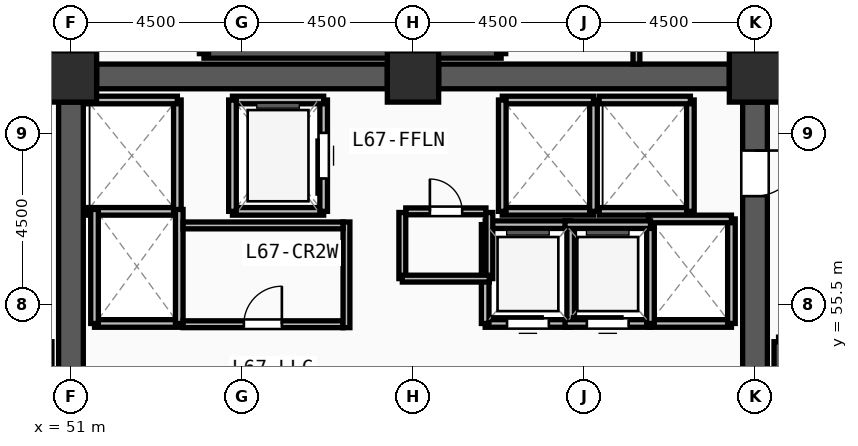
"""IFC4 building model, lengths in metres.
Left out: names, types, materials, properties, quantities, classifications, styles, units other than length and angle.
Written with IfcOpenShell. Run it as: python <this file> out.ifc"""

import sys

from ifc_helpers import new_model, si_unit, direction, frame, frame_2d, origin, origin_2d, place, context, subcontext, project, spatial, rectangle, extrude, source, transform, mapped, element, fill, save


model = new_model("IFC4")
c1 = context("Model", 3, precision=1e-05, world=origin(), true_north=direction((0.0, 1.0)))
c2 = subcontext(c1, "Body", "Model", "MODEL_VIEW")
j1 = project(units=[si_unit("LENGTHUNIT", "METRE"), si_unit("PLANEANGLEUNIT", "RADIAN")], contexts=[c1])
p1 = place(None, origin())
s1 = spatial("IfcSite", under=j1, at=p1, CompositionType="ELEMENT")
p2 = place(p1, origin())
s2 = spatial("IfcBuilding", under=s1, at=p2, CompositionType="ELEMENT")
p3 = place(p2, frame((0.0, 0.0, 258.75)))
s3 = spatial("IfcBuildingStorey", under=s2, at=p3, CompositionType="ELEMENT", Elevation=258.75)
m1 = source(origin(), c2, "Body", "SweptSolid", [
    extrude(rectangle(XDim=1.35, YDim=1.35, at=origin_2d()), origin(), (0.0, 0.0, 1.0), 3.75),
])
for number, where, z_axis, x_axis in (
    (1, (69.0, 61.5, 0.0), (0.0, 0.0, 1.0), (1.0, 0.0, 0.0)),
    (2, (60.0, 61.5, 0.0), (0.0, 0.0, 1.0), (1.0, 0.0, 0.0)),
    (3, (51.0, 61.5, 0.0), (0.0, 0.0, 1.0), (1.0, 0.0, 0.0)),
):
    element("IfcColumn", number, at=place(p3, frame(where, z_axis=z_axis, x_axis=x_axis)), inside=s3, PredefinedType="COLUMN", context=c2, shape_type="MappedRepresentation", body=[
        mapped(m1, transform((0.0, 0.0, 0.0), x_axis=(1.0, 0.0, 0.0), y_axis=(0.0, 1.0, 0.0), z_axis=(0.0, 0.0, 1.0), scale=1.0)),
    ])
for number, where, z_axis, x_axis in (
    (4, (51.675, 61.5, 0.0), (0.0, 0.0, 1.0), (1.0, 0.0, 0.0)),
    (5, (60.675, 61.5, 0.0), (0.0, 0.0, 1.0), (1.0, 0.0, 0.0)),
):
    element("IfcWall", number, at=place(p3, frame(where, z_axis=z_axis, x_axis=x_axis)), inside=s3, PredefinedType="SHEAR", context=c2, shape_type="SweptSolid", body=[
        extrude(rectangle(XDim=7.65, YDim=0.65, at=frame_2d((3.825, 0.0))), origin(), (0.0, 0.0, 1.0), 3.57),
    ])
p4 = place(p3, frame((69.0, 60.825, 0.0), z_axis=(0.0, 0.0, 1.0), x_axis=(0.0, -1.0, 0.0)))
e6 = element("IfcWall", 6, at=p4, inside=s3, PredefinedType="SHEAR", context=c2, shape_type="SweptSolid", body=[
    extrude(rectangle(XDim=13.65, YDim=0.65, at=frame_2d((6.825, 0.0))), origin(), (0.0, 0.0, 1.0), 3.57),
])
m2 = source(origin(), c2, "Body", "SweptSolid", [
    extrude(rectangle(XDim=1.2, YDim=2.2, at=frame_2d((0.6, 1.1))), frame((0.0, 0.335, 0.0), z_axis=(0.0, -1.0, 0.0), x_axis=(1.0, 0.0, 0.0)), (0.0, 0.0, 1.0), 0.67),
])
p5 = place(p4, frame((1.275, 0.0, 0.0)))
e7 = element("IfcOpeningElement", 7, at=p5, cuts=e6, PredefinedType="OPENING", context=c2, shape_type="MappedRepresentation", body=[
    mapped(m2, transform((0.0, 0.0, 0.0), x_axis=(1.0, 0.0, 0.0), y_axis=(0.0, 1.0, 0.0), z_axis=(0.0, 0.0, 1.0), scale=1.0)),
])
p6 = place(p3, frame((51.0, 47.175, 0.0), z_axis=(0.0, 0.0, 1.0), x_axis=(0.0, 1.0, 0.0)))
e8 = element("IfcWall", 8, at=p6, inside=s3, PredefinedType="SHEAR", context=c2, shape_type="SweptSolid", body=[
    extrude(rectangle(XDim=13.65, YDim=0.65, at=frame_2d((6.825, 0.0))), origin(), (0.0, 0.0, 1.0), 3.57),
])
for number, where, z_axis, x_axis in (
    (9, (69.62, 54.52, 0.0), (0.0, 0.0, 1.0), (0.0, -1.0, 0.0)),
    (10, (54.5, 62.1, 0.0), (0.0, 0.0, 1.0), (1.0, 0.0, 0.0)),
):
    element("IfcWall", number, at=place(p3, frame(where, z_axis=z_axis, x_axis=x_axis)), inside=s3, PredefinedType="SOLIDWALL", context=c2, shape_type="SweptSolid", body=[
        extrude(rectangle(XDim=7.82, YDim=0.24, at=frame_2d((3.91, 0.0))), origin(), (0.0, 0.0, 1.0), 3.57),
    ])
for number, where, z_axis, x_axis in (
    (11, (62.32, 62.1, 0.0), (0.0, 0.0, 1.0), (0.0, 1.0, 0.0)),
    (12, (54.5, 65.54, 0.0), (0.0, 0.0, 1.0), (0.0, -1.0, 0.0)),
):
    element("IfcWall", number, at=place(p3, frame(where, z_axis=z_axis, x_axis=x_axis)), inside=s3, PredefinedType="SOLIDWALL", context=c2, shape_type="SweptSolid", body=[
        extrude(rectangle(XDim=3.44, YDim=0.24, at=frame_2d((1.72, 0.0))), origin(), (0.0, 0.0, 1.0), 3.57),
    ])
p7 = place(p3, frame((55.25, 57.95, 0.0), z_axis=(0.0, 0.0, 1.0), x_axis=(1.0, 0.0, 0.0)))
e13 = element("IfcWall", 13, at=p7, inside=s3, PredefinedType="SOLIDWALL", context=c2, shape_type="SweptSolid", body=[
    extrude(rectangle(XDim=2.4, YDim=0.2, at=frame_2d((1.2, 0.0))), origin(), (0.0, 0.0, 1.0), 3.57),
])
p8 = place(p3, frame((57.65, 57.95, 0.0), z_axis=(0.0, 0.0, 1.0), x_axis=(0.0, 1.0, 0.0)))
e14 = element("IfcWall", 14, at=p8, inside=s3, PredefinedType="SOLIDWALL", context=c2, shape_type="SweptSolid", body=[
    extrude(rectangle(XDim=2.93, YDim=0.2, at=frame_2d((1.465, 0.0))), origin(), (0.0, 0.0, 1.0), 3.57),
])
m3 = source(origin(), c2, "Body", "SweptSolid", [
    extrude(rectangle(XDim=1.2, YDim=2.3, at=frame_2d((0.6, 1.15))), frame((0.0, 0.11, 0.0), z_axis=(0.0, -1.0, 0.0), x_axis=(1.0, 0.0, 0.0)), (0.0, 0.0, 1.0), 0.22),
])
p9 = place(p8, frame((0.865, 0.0, 0.0)))
e15 = element("IfcOpeningElement", 15, at=p9, cuts=e14, PredefinedType="OPENING", context=c2, shape_type="MappedRepresentation", body=[
    mapped(m3, transform((0.0, 0.0, 0.0), x_axis=(1.0, 0.0, 0.0), y_axis=(0.0, 1.0, 0.0), z_axis=(0.0, 0.0, 1.0), scale=1.0)),
])
p10 = place(p3, frame((57.65, 60.88, 0.0), z_axis=(0.0, 0.0, 1.0), x_axis=(-1.0, 0.0, 0.0)))
e16 = element("IfcWall", 16, at=p10, inside=s3, PredefinedType="SOLIDWALL", context=c2, shape_type="SweptSolid", body=[
    extrude(rectangle(XDim=2.4, YDim=0.2, at=frame_2d((1.2, 0.0))), origin(), (0.0, 0.0, 1.0), 3.57),
])
p11 = place(p3, frame((55.25, 60.88, 0.0), z_axis=(0.0, 0.0, 1.0), x_axis=(0.0, -1.0, 0.0)))
e17 = element("IfcWall", 17, at=p11, inside=s3, PredefinedType="SOLIDWALL", context=c2, shape_type="SweptSolid", body=[
    extrude(rectangle(XDim=2.93, YDim=0.2, at=frame_2d((1.465, 0.0))), origin(), (0.0, 0.0, 1.0), 3.57),
])
p12 = place(p3, frame((62.35, 57.95, 0.0), z_axis=(0.0, 0.0, 1.0), x_axis=(1.0, 0.0, 0.0)))
e18 = element("IfcWall", 18, at=p12, inside=s3, PredefinedType="SOLIDWALL", context=c2, shape_type="SweptSolid", body=[
    extrude(rectangle(XDim=2.4, YDim=0.2, at=frame_2d((1.2, 0.0))), origin(), (0.0, 0.0, 1.0), 3.57),
])
p13 = place(p3, frame((64.75, 57.95, 0.0), z_axis=(0.0, 0.0, 1.0), x_axis=(0.0, 1.0, 0.0)))
e19 = element("IfcWall", 19, at=p13, inside=s3, PredefinedType="SOLIDWALL", context=c2, shape_type="SweptSolid", body=[
    extrude(rectangle(XDim=2.93, YDim=0.2, at=frame_2d((1.465, 0.0))), origin(), (0.0, 0.0, 1.0), 3.57),
])
p14 = place(p3, frame((64.75, 60.88, 0.0), z_axis=(0.0, 0.0, 1.0), x_axis=(-1.0, 0.0, 0.0)))
e20 = element("IfcWall", 20, at=p14, inside=s3, PredefinedType="SOLIDWALL", context=c2, shape_type="SweptSolid", body=[
    extrude(rectangle(XDim=2.4, YDim=0.2, at=frame_2d((1.2, 0.0))), origin(), (0.0, 0.0, 1.0), 3.57),
])
p15 = place(p3, frame((62.35, 60.88, 0.0), z_axis=(0.0, 0.0, 1.0), x_axis=(0.0, -1.0, 0.0)))
e21 = element("IfcWall", 21, at=p15, inside=s3, PredefinedType="SOLIDWALL", context=c2, shape_type="SweptSolid", body=[
    extrude(rectangle(XDim=2.93, YDim=0.2, at=frame_2d((1.465, 0.0))), origin(), (0.0, 0.0, 1.0), 3.57),
])
p16 = place(p3, frame((64.9, 57.95, 0.0), z_axis=(0.0, 0.0, 1.0), x_axis=(1.0, 0.0, 0.0)))
e22 = element("IfcWall", 22, at=p16, inside=s3, PredefinedType="SOLIDWALL", context=c2, shape_type="SweptSolid", body=[
    extrude(rectangle(XDim=2.4, YDim=0.2, at=frame_2d((1.2, 0.0))), origin(), (0.0, 0.0, 1.0), 3.57),
])
p17 = place(p3, frame((67.3, 57.95, 0.0), z_axis=(0.0, 0.0, 1.0), x_axis=(0.0, 1.0, 0.0)))
e23 = element("IfcWall", 23, at=p17, inside=s3, PredefinedType="SOLIDWALL", context=c2, shape_type="SweptSolid", body=[
    extrude(rectangle(XDim=2.93, YDim=0.2, at=frame_2d((1.465, 0.0))), origin(), (0.0, 0.0, 1.0), 3.57),
])
for number, where, z_axis, x_axis in (
    (24, (67.3, 60.88, 0.0), (0.0, 0.0, 1.0), (-1.0, 0.0, 0.0)),
    (25, (51.4, 57.95, 0.0), (0.0, 0.0, 1.0), (1.0, 0.0, 0.0)),
):
    element("IfcWall", number, at=place(p3, frame(where, z_axis=z_axis, x_axis=x_axis)), inside=s3, PredefinedType="SOLIDWALL", context=c2, shape_type="SweptSolid", body=[
        extrude(rectangle(XDim=2.4, YDim=0.2, at=frame_2d((1.2, 0.0))), origin(), (0.0, 0.0, 1.0), 3.57),
    ])
p18 = place(p3, frame((53.8, 57.95, 0.0), z_axis=(0.0, 0.0, 1.0), x_axis=(0.0, 1.0, 0.0)))
e26 = element("IfcWall", 26, at=p18, inside=s3, PredefinedType="SOLIDWALL", context=c2, shape_type="SweptSolid", body=[
    extrude(rectangle(XDim=2.93, YDim=0.2, at=frame_2d((1.465, 0.0))), origin(), (0.0, 0.0, 1.0), 3.57),
])
p19 = place(p3, frame((53.8, 60.88, 0.0), z_axis=(0.0, 0.0, 1.0), x_axis=(-1.0, 0.0, 0.0)))
e27 = element("IfcWall", 27, at=p19, inside=s3, PredefinedType="SOLIDWALL", context=c2, shape_type="SweptSolid", body=[
    extrude(rectangle(XDim=2.4, YDim=0.2, at=frame_2d((1.2, 0.0))), origin(), (0.0, 0.0, 1.0), 3.57),
])
p20 = place(p3, frame((51.62, 55.0, 0.0), z_axis=(0.0, 0.0, 1.0), x_axis=(1.0, 0.0, 0.0)))
e28 = element("IfcWall", 28, at=p20, inside=s3, PredefinedType="SOLIDWALL", context=c2, shape_type="SweptSolid", body=[
    extrude(rectangle(XDim=2.23, YDim=0.2, at=frame_2d((1.115, 0.0))), origin(), (0.0, 0.0, 1.0), 3.57),
])
for number, where, z_axis, x_axis in (
    (29, (53.85, 55.0, 0.0), (0.0, 0.0, 1.0), (0.0, 1.0, 0.0)),
    (30, (51.62, 58.0, 0.0), (0.0, 0.0, 1.0), (0.0, -1.0, 0.0)),
):
    element("IfcWall", number, at=place(p3, frame(where, z_axis=z_axis, x_axis=x_axis)), inside=s3, PredefinedType="SOLIDWALL", context=c2, shape_type="SweptSolid", body=[
        extrude(rectangle(XDim=3.0, YDim=0.2, at=frame_2d((1.5, 0.0))), origin(), (0.0, 0.0, 1.0), 3.57),
    ])
p21 = place(p3, frame((66.2, 55.0, 0.0), z_axis=(0.0, 0.0, 1.0), x_axis=(1.0, 0.0, 0.0)))
e31 = element("IfcWall", 31, at=p21, inside=s3, PredefinedType="SOLIDWALL", context=c2, shape_type="SweptSolid", body=[
    extrude(rectangle(XDim=2.18, YDim=0.2, at=frame_2d((1.09, 0.0))), origin(), (0.0, 0.0, 1.0), 3.57),
])
p22 = place(p3, frame((68.38, 55.0, 0.0), z_axis=(0.0, 0.0, 1.0), x_axis=(0.0, 1.0, 0.0)))
e32 = element("IfcWall", 32, at=p22, inside=s3, PredefinedType="SOLIDWALL", context=c2, shape_type="SweptSolid", body=[
    extrude(rectangle(XDim=2.75, YDim=0.2, at=frame_2d((1.375, 0.0))), origin(), (0.0, 0.0, 1.0), 3.57),
])
p23 = place(p3, frame((68.38, 57.75, 0.0), z_axis=(0.0, 0.0, 1.0), x_axis=(-1.0, 0.0, 0.0)))
e33 = element("IfcWall", 33, at=p23, inside=s3, PredefinedType="SOLIDWALL", context=c2, shape_type="SweptSolid", body=[
    extrude(rectangle(XDim=2.18, YDim=0.2, at=frame_2d((1.09, 0.0))), origin(), (0.0, 0.0, 1.0), 3.57),
])
p24 = place(p3, frame((61.9, 55.0, 0.0), z_axis=(0.0, 0.0, 1.0), x_axis=(1.0, 0.0, 0.0)))
e34 = element("IfcWall", 34, at=p24, inside=s3, PredefinedType="SOLIDWALL", context=c2, shape_type="SweptSolid", body=[
    extrude(rectangle(XDim=2.25, YDim=0.2, at=frame_2d((1.125, 0.0))), origin(), (0.0, 0.0, 1.0), 3.57),
])
m4 = source(origin(), c2, "Body", "SweptSolid", [
    extrude(rectangle(XDim=1.1, YDim=2.2, at=frame_2d((0.55, 1.1))), frame((0.0, 0.11, 0.0), z_axis=(0.0, -1.0, 0.0), x_axis=(1.0, 0.0, 0.0)), (0.0, 0.0, 1.0), 0.22),
])
p25 = place(p24, frame((0.575, 0.0, 0.0)))
e35 = element("IfcOpeningElement", 35, at=p25, cuts=e34, PredefinedType="OPENING", context=c2, shape_type="MappedRepresentation", body=[
    mapped(m4, transform((0.0, 0.0, 0.0), x_axis=(1.0, 0.0, 0.0), y_axis=(0.0, 1.0, 0.0), z_axis=(0.0, 0.0, 1.0), scale=1.0)),
])
p26 = place(p3, frame((64.15, 55.0, 0.0), z_axis=(0.0, 0.0, 1.0), x_axis=(0.0, 1.0, 0.0)))
e36 = element("IfcWall", 36, at=p26, inside=s3, PredefinedType="SOLIDWALL", context=c2, shape_type="SweptSolid", body=[
    extrude(rectangle(XDim=2.6, YDim=0.2, at=frame_2d((1.3, 0.0))), origin(), (0.0, 0.0, 1.0), 3.57),
])
p27 = place(p3, frame((64.15, 57.6, 0.0), z_axis=(0.0, 0.0, 1.0), x_axis=(-1.0, 0.0, 0.0)))
e37 = element("IfcWall", 37, at=p27, inside=s3, PredefinedType="SOLIDWALL", context=c2, shape_type="SweptSolid", body=[
    extrude(rectangle(XDim=2.25, YDim=0.2, at=frame_2d((1.125, 0.0))), origin(), (0.0, 0.0, 1.0), 3.57),
])
p28 = place(p3, frame((61.9, 57.6, 0.0), z_axis=(0.0, 0.0, 1.0), x_axis=(0.0, -1.0, 0.0)))
e38 = element("IfcWall", 38, at=p28, inside=s3, PredefinedType="SOLIDWALL", context=c2, shape_type="SweptSolid", body=[
    extrude(rectangle(XDim=2.6, YDim=0.2, at=frame_2d((1.3, 0.0))), origin(), (0.0, 0.0, 1.0), 3.57),
])
p29 = place(p3, frame((64.0, 55.0, 0.0), z_axis=(0.0, 0.0, 1.0), x_axis=(1.0, 0.0, 0.0)))
e39 = element("IfcWall", 39, at=p29, inside=s3, PredefinedType="SOLIDWALL", context=c2, shape_type="SweptSolid", body=[
    extrude(rectangle(XDim=2.25, YDim=0.2, at=frame_2d((1.125, 0.0))), origin(), (0.0, 0.0, 1.0), 3.57),
])
p30 = place(p29, frame((0.575, 0.0, 0.0)))
e40 = element("IfcOpeningElement", 40, at=p30, cuts=e39, PredefinedType="OPENING", context=c2, shape_type="MappedRepresentation", body=[
    mapped(m4, transform((0.0, 0.0, 0.0), x_axis=(1.0, 0.0, 0.0), y_axis=(0.0, 1.0, 0.0), z_axis=(0.0, 0.0, 1.0), scale=1.0)),
])
p31 = place(p3, frame((66.25, 55.0, 0.0), z_axis=(0.0, 0.0, 1.0), x_axis=(0.0, 1.0, 0.0)))
e41 = element("IfcWall", 41, at=p31, inside=s3, PredefinedType="SOLIDWALL", context=c2, shape_type="SweptSolid", body=[
    extrude(rectangle(XDim=2.6, YDim=0.2, at=frame_2d((1.3, 0.0))), origin(), (0.0, 0.0, 1.0), 3.57),
])
p32 = place(p3, frame((66.25, 57.6, 0.0), z_axis=(0.0, 0.0, 1.0), x_axis=(-1.0, 0.0, 0.0)))
e42 = element("IfcWall", 42, at=p32, inside=s3, PredefinedType="SOLIDWALL", context=c2, shape_type="SweptSolid", body=[
    extrude(rectangle(XDim=2.25, YDim=0.2, at=frame_2d((1.125, 0.0))), origin(), (0.0, 0.0, 1.0), 3.57),
])
p33 = place(p3, frame((53.95, 54.98, 0.0), z_axis=(0.0, 0.0, 1.0), x_axis=(1.0, 0.0, 0.0)))
e43 = element("IfcWall", 43, at=p33, inside=s3, PredefinedType="PARTITIONING", context=c2, shape_type="SweptSolid", body=[
    extrude(rectangle(XDim=4.21, YDim=0.18, at=frame_2d((2.105, 0.0))), origin(), (0.0, 0.0, 1.0), 3.57),
])
m5 = source(origin(), c2, "Body", "SweptSolid", [
    extrude(rectangle(XDim=1.0, YDim=2.2, at=frame_2d((0.5, 1.1))), frame((0.0, 0.1, 0.0), z_axis=(0.0, -1.0, 0.0), x_axis=(1.0, 0.0, 0.0)), (0.0, 0.0, 1.0), 0.2),
])
p34 = place(p33, frame((1.6, 0.0, 0.0)))
e44 = element("IfcOpeningElement", 44, at=p34, cuts=e43, PredefinedType="OPENING", context=c2, shape_type="MappedRepresentation", body=[
    mapped(m5, transform((0.0, 0.0, 0.0), x_axis=(1.0, 0.0, 0.0), y_axis=(0.0, 1.0, 0.0), z_axis=(0.0, 0.0, 1.0), scale=1.0)),
])
p35 = place(p3, frame((59.81, 57.95, 0.0), z_axis=(0.0, 0.0, 1.0), x_axis=(1.0, 0.0, 0.0)))
e45 = element("IfcWall", 45, at=p35, inside=s3, PredefinedType="PARTITIONING", context=c2, shape_type="SweptSolid", body=[
    extrude(rectangle(XDim=2.11, YDim=0.18, at=frame_2d((1.055, 0.0))), origin(), (0.0, 0.0, 1.0), 3.57),
])
m6 = source(origin(), c2, "Body", "SweptSolid", [
    extrude(rectangle(XDim=0.85, YDim=2.1, at=frame_2d((0.425, 1.05))), frame((0.0, 0.1, 0.0), z_axis=(0.0, -1.0, 0.0), x_axis=(1.0, 0.0, 0.0)), (0.0, 0.0, 1.0), 0.2),
])
p36 = place(p35, frame((0.635, 0.0, 0.0)))
e46 = element("IfcOpeningElement", 46, at=p36, cuts=e45, PredefinedType="OPENING", context=c2, shape_type="MappedRepresentation", body=[
    mapped(m6, transform((0.0, 0.0, 0.0), x_axis=(1.0, 0.0, 0.0), y_axis=(0.0, 1.0, 0.0), z_axis=(0.0, 0.0, 1.0), scale=1.0)),
])
for number, where, z_axis, x_axis in (
    (47, (59.72, 56.18, 0.0), (0.0, 0.0, 1.0), (0.0, 1.0, 0.0)),
    (48, (62.01, 56.18, 0.0), (0.0, 0.0, 1.0), (0.0, 1.0, 0.0)),
):
    element("IfcWall", number, at=place(p3, frame(where, z_axis=z_axis, x_axis=x_axis)), inside=s3, PredefinedType="PARTITIONING", context=c2, shape_type="SweptSolid", body=[
        extrude(rectangle(XDim=1.74, YDim=0.18, at=frame_2d((0.87, 0.0))), origin(), (0.0, 0.0, 1.0), 3.57),
    ])
p37 = place(p3, frame((59.72, 56.18, 0.0), z_axis=(0.0, 0.0, 1.0), x_axis=(1.0, 0.0, 0.0)))
e49 = element("IfcWall", 49, at=p37, inside=s3, PredefinedType="PARTITIONING", context=c2, shape_type="SweptSolid", body=[
    extrude(rectangle(XDim=2.29, YDim=0.18, at=frame_2d((1.145, 0.0))), origin(), (0.0, 0.0, 1.0), 3.57),
])
p38 = place(p3, frame((65.88, 61.825, 0.0), z_axis=(0.0, 0.0, 1.0), x_axis=(0.0, 1.0, 0.0)))
e50 = element("IfcWall", 50, at=p38, inside=s3, PredefinedType="PARTITIONING", context=c2, shape_type="SweptSolid", body=[
    extrude(rectangle(XDim=3.755, YDim=0.18, at=frame_2d((1.877, 0.0))), origin(), (0.0, 0.0, 1.0), 3.57),
])
p39 = place(p3, frame((69.46, 61.95, 0.0), z_axis=(0.0, 0.0, 1.0), x_axis=(0.0, 1.0, 0.0)))
e51 = element("IfcWall", 51, at=p39, inside=s3, PredefinedType="PARTITIONING", context=c2, shape_type="SweptSolid", body=[
    extrude(rectangle(XDim=3.63, YDim=0.18, at=frame_2d((1.815, 0.0))), origin(), (0.0, 0.0, 1.0), 3.57),
])
p40 = place(p3, frame((58.25, 54.89, 0.0), z_axis=(0.0, 0.0, 1.0), x_axis=(0.0, 1.0, 0.0)))
e52 = element("IfcWall", 52, at=p40, inside=s3, PredefinedType="PARTITIONING", context=c2, shape_type="SweptSolid", body=[
    extrude(rectangle(XDim=2.78, YDim=0.18, at=frame_2d((1.39, 0.0))), origin(), (0.0, 0.0, 1.0), 3.57),
])
p41 = place(p3, frame((53.95, 57.58, 0.0), z_axis=(0.0, 0.0, 1.0), x_axis=(1.0, 0.0, 0.0)))
e53 = element("IfcWall", 53, at=p41, inside=s3, PredefinedType="PARTITIONING", context=c2, shape_type="SweptSolid", body=[
    extrude(rectangle(XDim=4.21, YDim=0.18, at=frame_2d((2.105, 0.0))), origin(), (0.0, 0.0, 1.0), 3.57),
])
m7 = source(origin(), c2, "Body", "SweptSolid", [
    extrude(rectangle(XDim=1.2, YDim=2.2, at=frame_2d((0.6, 1.1))), frame((0.0, 0.025, 0.0), z_axis=(0.0, -1.0, 0.0), x_axis=(1.0, 0.0, 0.0)), (0.0, 0.0, 1.0), 0.05),
])
p42 = place(p5, origin())
e54 = element("IfcDoor", 54, at=p42, inside=s3, OperationType="SINGLE_SWING_LEFT", PredefinedType="DOOR", context=c2, shape_type="MappedRepresentation", body=[
    mapped(m7, transform((0.0, 0.0, 0.0), x_axis=(1.0, 0.0, 0.0), y_axis=(0.0, 1.0, 0.0), z_axis=(0.0, 0.0, 1.0), scale=1.0)),
])
fill(e7, e54)
m8 = source(origin(), c2, "Body", "SweptSolid", [
    extrude(rectangle(XDim=1.2, YDim=2.3, at=frame_2d((0.6, 1.15))), frame((0.0, 0.025, 0.0), z_axis=(0.0, -1.0, 0.0), x_axis=(1.0, 0.0, 0.0)), (0.0, 0.0, 1.0), 0.05),
])
p43 = place(p9, origin())
e55 = element("IfcDoor", 55, at=p43, inside=s3, OperationType="SLIDING_TO_LEFT", PredefinedType="DOOR", context=c2, shape_type="MappedRepresentation", body=[
    mapped(m8, transform((0.0, 0.0, 0.0), x_axis=(1.0, 0.0, 0.0), y_axis=(0.0, 1.0, 0.0), z_axis=(0.0, 0.0, 1.0), scale=1.0)),
])
fill(e15, e55)
m9 = source(origin(), c2, "Body", "SweptSolid", [
    extrude(rectangle(XDim=1.1, YDim=2.2, at=frame_2d((0.55, 1.1))), frame((0.0, 0.025, 0.0), z_axis=(0.0, -1.0, 0.0), x_axis=(1.0, 0.0, 0.0)), (0.0, 0.0, 1.0), 0.05),
])
p44 = place(p25, origin())
e56 = element("IfcDoor", 56, at=p44, inside=s3, OperationType="SLIDING_TO_LEFT", PredefinedType="DOOR", context=c2, shape_type="MappedRepresentation", body=[
    mapped(m9, transform((0.0, 0.0, 0.0), x_axis=(1.0, 0.0, 0.0), y_axis=(0.0, 1.0, 0.0), z_axis=(0.0, 0.0, 1.0), scale=1.0)),
])
fill(e35, e56)
p45 = place(p30, origin())
e57 = element("IfcDoor", 57, at=p45, inside=s3, OperationType="SLIDING_TO_LEFT", PredefinedType="DOOR", context=c2, shape_type="MappedRepresentation", body=[
    mapped(m9, transform((0.0, 0.0, 0.0), x_axis=(1.0, 0.0, 0.0), y_axis=(0.0, 1.0, 0.0), z_axis=(0.0, 0.0, 1.0), scale=1.0)),
])
fill(e40, e57)
m10 = source(origin(), c2, "Body", "SweptSolid", [
    extrude(rectangle(XDim=1.0, YDim=2.2, at=frame_2d((0.5, 1.1))), frame((0.0, 0.025, 0.0), z_axis=(0.0, -1.0, 0.0), x_axis=(1.0, 0.0, 0.0)), (0.0, 0.0, 1.0), 0.05),
])
p46 = place(p34, origin())
e58 = element("IfcDoor", 58, at=p46, inside=s3, OperationType="SINGLE_SWING_RIGHT", PredefinedType="DOOR", context=c2, shape_type="MappedRepresentation", body=[
    mapped(m10, transform((0.0, 0.0, 0.0), x_axis=(1.0, 0.0, 0.0), y_axis=(0.0, 1.0, 0.0), z_axis=(0.0, 0.0, 1.0), scale=1.0)),
])
fill(e44, e58)
m11 = source(origin(), c2, "Body", "SweptSolid", [
    extrude(rectangle(XDim=0.85, YDim=2.1, at=frame_2d((0.425, 1.05))), frame((0.0, 0.025, 0.0), z_axis=(0.0, -1.0, 0.0), x_axis=(1.0, 0.0, 0.0)), (0.0, 0.0, 1.0), 0.05),
])
p47 = place(p36, origin())
e59 = element("IfcDoor", 59, at=p47, inside=s3, OperationType="SINGLE_SWING_LEFT", PredefinedType="DOOR", context=c2, shape_type="MappedRepresentation", body=[
    mapped(m11, transform((0.0, 0.0, 0.0), x_axis=(1.0, 0.0, 0.0), y_axis=(0.0, 1.0, 0.0), z_axis=(0.0, 0.0, 1.0), scale=1.0)),
])
fill(e46, e59)
save(model, sys.argv[1])
